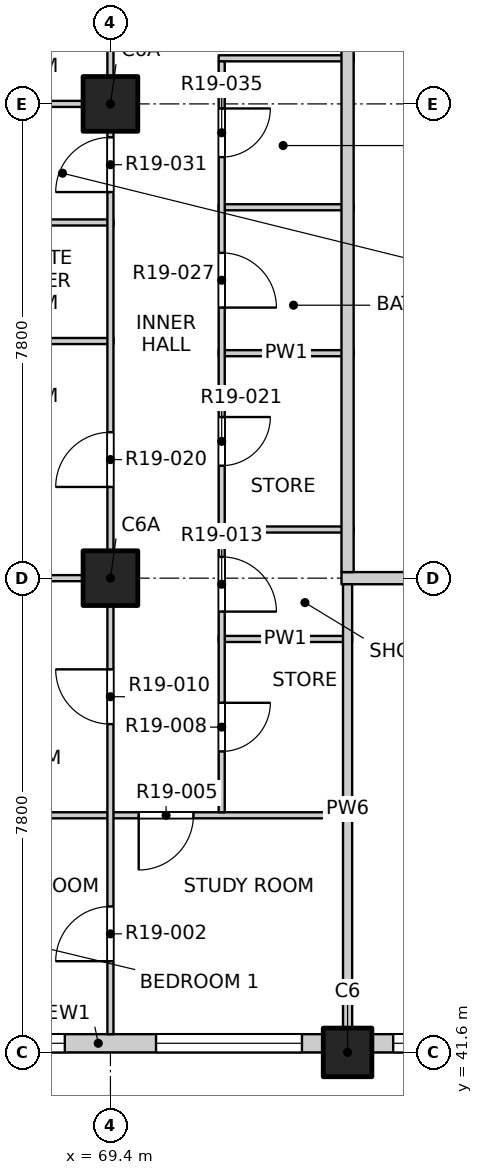
"""IFC4 building model, lengths in metres.
Left out: names, types, materials, properties, quantities, classifications, styles, units other than length and angle.
Written with IfcOpenShell. Run it as: python <this file> out.ifc"""

import sys

from ifc_helpers import new_model, si_unit, direction, frame, frame_2d, origin, origin_2d, place, context, subcontext, project, spatial, rectangle, extrude, element, fill, save


model = new_model("IFC4")
c1 = context("Model", 3, precision=1e-05, world=origin(), true_north=direction((0.0, 1.0)))
c2 = subcontext(c1, "Body", "Model", "MODEL_VIEW")
j1 = project(units=[si_unit("LENGTHUNIT", "METRE"), si_unit("PLANEANGLEUNIT", "RADIAN")], contexts=[c1])
p1 = place(None, origin())
s1 = spatial("IfcSite", under=j1, at=p1, CompositionType="ELEMENT")
p2 = place(p1, origin())
s2 = spatial("IfcBuilding", under=s1, at=p2, CompositionType="ELEMENT")
p3 = place(p2, frame((0.0, 0.0, 197.3)))
s3 = spatial("IfcBuildingStorey", under=s2, at=p3, CompositionType="ELEMENT", Elevation=197.3)
p4 = place(p3, frame((73.3, 41.6, -0.3), z_axis=(0.0, 0.0, 1.0), x_axis=(1.0, 0.0, 0.0)))
e1 = element("IfcColumn", 1, at=p4, inside=s3, PredefinedType="COLUMN", context=c2, shape_type="SweptSolid", body=[
    extrude(rectangle(XDim=0.8, YDim=0.8, at=origin_2d()), origin(), (0.0, 0.0, 1.0), 3.45),
])
for number, where, z_axis, x_axis in (
    (2, (69.4, 49.4, -0.3), (0.0, 0.0, 1.0), (1.0, 0.0, 0.0)),
    (3, (69.4, 57.2, -0.3), (0.0, 0.0, 1.0), (1.0, 0.0, 0.0)),
):
    element("IfcColumn", number, at=place(p3, frame(where, z_axis=z_axis, x_axis=x_axis)), inside=s3, PredefinedType="COLUMN", context=c2, shape_type="SweptSolid", body=[
        extrude(rectangle(XDim=0.9, YDim=0.9, at=origin_2d()), origin(), (0.0, 0.0, 1.0), 3.45),
    ])
p5 = place(p3, frame((65.5, 41.75, 0.0), z_axis=(0.0, 0.0, 1.0), x_axis=(1.0, 0.0, 0.0)))
e4 = element("IfcWall", 4, at=p5, inside=s3, PredefinedType="SOLIDWALL", context=c2, shape_type="SweptSolid", body=[
    extrude(rectangle(XDim=7.4, YDim=0.3, at=frame_2d((3.7, 0.0))), origin(), (0.0, 0.0, 1.0), 2.7),
])
p6 = place(p5, frame((0.75, 0.0, 0.9)))
e5 = element("IfcOpeningElement", 5, at=p6, cuts=e4, PredefinedType="OPENING", context=c2, shape_type="SweptSolid", body=[
    extrude(rectangle(XDim=2.4, YDim=1.8, at=frame_2d((1.2, 0.9))), frame((0.0, 0.16, 0.0), z_axis=(0.0, -1.0, 0.0), x_axis=(1.0, 0.0, 0.0)), (0.0, 0.0, 1.0), 0.32),
])
p7 = place(p5, frame((4.65, 0.0, 0.9)))
e6 = element("IfcOpeningElement", 6, at=p7, cuts=e4, PredefinedType="OPENING", context=c2, shape_type="SweptSolid", body=[
    extrude(rectangle(XDim=2.4, YDim=1.8, at=frame_2d((1.2, 0.9))), frame((0.0, 0.16, 0.0), z_axis=(0.0, -1.0, 0.0), x_axis=(1.0, 0.0, 0.0)), (0.0, 0.0, 1.0), 0.32),
])
p8 = place(p3, frame((73.7, 41.75, 0.0), z_axis=(0.0, 0.0, 1.0), x_axis=(1.0, 0.0, 0.0)))
e7 = element("IfcWall", 7, at=p8, inside=s3, PredefinedType="SOLIDWALL", context=c2, shape_type="SweptSolid", body=[
    extrude(rectangle(XDim=7.0, YDim=0.3, at=frame_2d((3.5, 0.0))), origin(), (0.0, 0.0, 1.0), 2.7),
])
p9 = place(p8, frame((0.35, 0.0, 0.9)))
e8 = element("IfcOpeningElement", 8, at=p9, cuts=e7, PredefinedType="OPENING", context=c2, shape_type="SweptSolid", body=[
    extrude(rectangle(XDim=2.4, YDim=1.8, at=frame_2d((1.2, 0.9))), frame((0.0, 0.16, 0.0), z_axis=(0.0, -1.0, 0.0), x_axis=(1.0, 0.0, 0.0)), (0.0, 0.0, 1.0), 0.32),
])
p10 = place(p8, frame((4.25, 0.0, 0.9)))
e9 = element("IfcOpeningElement", 9, at=p10, cuts=e7, PredefinedType="OPENING", context=c2, shape_type="SweptSolid", body=[
    extrude(rectangle(XDim=2.4, YDim=1.8, at=frame_2d((1.2, 0.9))), frame((0.0, 0.16, 0.0), z_axis=(0.0, -1.0, 0.0), x_axis=(1.0, 0.0, 0.0)), (0.0, 0.0, 1.0), 0.32),
])
p11 = place(p3, frame((61.9, 45.5, 0.0), z_axis=(0.0, 0.0, 1.0), x_axis=(1.0, 0.0, 0.0)))
e10 = element("IfcWall", 10, at=p11, inside=s3, PredefinedType="PARTITIONING", context=c2, shape_type="SweptSolid", body=[
    extrude(rectangle(XDim=11.475, YDim=0.1, at=frame_2d((5.737, 0.0))), origin(), (0.0, 0.0, 1.0), 3.15),
])
p12 = place(p11, frame((7.965, 0.0, 0.0)))
e11 = element("IfcOpeningElement", 11, at=p12, cuts=e10, PredefinedType="OPENING", context=c2, shape_type="SweptSolid", body=[
    extrude(rectangle(XDim=0.9, YDim=2.1, at=frame_2d((0.45, 1.05))), frame((0.0, 0.06, 0.0), z_axis=(0.0, -1.0, 0.0), x_axis=(1.0, 0.0, 0.0)), (0.0, 0.0, 1.0), 0.12),
])
p13 = place(p3, frame((71.18, 48.4, 0.0), z_axis=(0.0, 0.0, 1.0), x_axis=(1.0, 0.0, 0.0)))
e12 = element("IfcWall", 12, at=p13, inside=s3, PredefinedType="PARTITIONING", context=c2, shape_type="SweptSolid", body=[
    extrude(rectangle(XDim=2.195, YDim=0.1, at=frame_2d((1.097, 0.0))), origin(), (0.0, 0.0, 1.0), 3.15),
])
p14 = place(p3, frame((61.9, 49.4, 0.0), z_axis=(0.0, 0.0, 1.0), x_axis=(1.0, 0.0, 0.0)))
e13 = element("IfcWall", 13, at=p14, inside=s3, PredefinedType="PARTITIONING", context=c2, shape_type="SweptSolid", body=[
    extrude(rectangle(XDim=7.55, YDim=0.1, at=frame_2d((3.775, 0.0))), origin(), (0.0, 0.0, 1.0), 3.15),
])
p15 = place(p3, frame((73.2, 49.4, 0.0), z_axis=(0.0, 0.0, 1.0), x_axis=(1.0, 0.0, 0.0)))
e14 = element("IfcWall", 14, at=p15, inside=s3, PredefinedType="PARTITIONING", context=c2, shape_type="SweptSolid", body=[
    extrude(rectangle(XDim=23.6, YDim=0.2, at=frame_2d((11.8, 0.0))), origin(), (0.0, 0.0, 1.0), 3.15),
])
p16 = place(p15, frame((2.25, 0.0, 0.0)))
e15 = element("IfcOpeningElement", 15, at=p16, cuts=e14, PredefinedType="OPENING", context=c2, shape_type="SweptSolid", body=[
    extrude(rectangle(XDim=1.2, YDim=2.1, at=frame_2d((0.6, 1.05))), frame((0.0, 0.11, 0.0), z_axis=(0.0, -1.0, 0.0), x_axis=(1.0, 0.0, 0.0)), (0.0, 0.0, 1.0), 0.22),
])
p17 = place(p15, frame((12.375, 0.0, 0.0)))
e16 = element("IfcOpeningElement", 16, at=p17, cuts=e14, PredefinedType="OPENING", context=c2, shape_type="SweptSolid", body=[
    extrude(rectangle(XDim=1.2, YDim=2.1, at=frame_2d((0.6, 1.05))), frame((0.0, 0.11, 0.0), z_axis=(0.0, -1.0, 0.0), x_axis=(1.0, 0.0, 0.0)), (0.0, 0.0, 1.0), 0.22),
])
p18 = place(p15, frame((20.15, 0.0, 0.0)))
e17 = element("IfcOpeningElement", 17, at=p18, cuts=e14, PredefinedType="OPENING", context=c2, shape_type="SweptSolid", body=[
    extrude(rectangle(XDim=1.2, YDim=2.1, at=frame_2d((0.6, 1.05))), frame((0.0, 0.11, 0.0), z_axis=(0.0, -1.0, 0.0), x_axis=(1.0, 0.0, 0.0)), (0.0, 0.0, 1.0), 0.22),
])
for number, where, z_axis, x_axis in (
    (18, (71.18, 50.2, 0.0), (0.0, 0.0, 1.0), (1.0, 0.0, 0.0)),
    (19, (71.18, 53.1, 0.0), (0.0, 0.0, 1.0), (1.0, 0.0, 0.0)),
):
    element("IfcWall", number, at=place(p3, frame(where, z_axis=z_axis, x_axis=x_axis)), inside=s3, PredefinedType="PARTITIONING", context=c2, shape_type="SweptSolid", body=[
        extrude(rectangle(XDim=2.22, YDim=0.1, at=frame_2d((1.11, 0.0))), origin(), (0.0, 0.0, 1.0), 3.15),
    ])
p19 = place(p3, frame((61.9, 53.3, 0.0), z_axis=(0.0, 0.0, 1.0), x_axis=(1.0, 0.0, 0.0)))
e20 = element("IfcWall", 20, at=p19, inside=s3, PredefinedType="PARTITIONING", context=c2, shape_type="SweptSolid", body=[
    extrude(rectangle(XDim=7.55, YDim=0.1, at=frame_2d((3.775, 0.0))), origin(), (0.0, 0.0, 1.0), 3.15),
])
p20 = place(p3, frame((66.05, 55.25, 0.0), z_axis=(0.0, 0.0, 1.0), x_axis=(1.0, 0.0, 0.0)))
e21 = element("IfcWall", 21, at=p20, inside=s3, PredefinedType="PARTITIONING", context=c2, shape_type="SweptSolid", body=[
    extrude(rectangle(XDim=3.4, YDim=0.1, at=frame_2d((1.7, 0.0))), origin(), (0.0, 0.0, 1.0), 3.15),
])
p21 = place(p3, frame((71.18, 55.5, 0.0), z_axis=(0.0, 0.0, 1.0), x_axis=(1.0, 0.0, 0.0)))
e22 = element("IfcWall", 22, at=p21, inside=s3, PredefinedType="PARTITIONING", context=c2, shape_type="SweptSolid", body=[
    extrude(rectangle(XDim=2.22, YDim=0.1, at=frame_2d((1.11, 0.0))), origin(), (0.0, 0.0, 1.0), 3.15),
])
p22 = place(p3, frame((61.9, 57.2, 0.0), z_axis=(0.0, 0.0, 1.0), x_axis=(1.0, 0.0, 0.0)))
e23 = element("IfcWall", 23, at=p22, inside=s3, PredefinedType="PARTITIONING", context=c2, shape_type="SweptSolid", body=[
    extrude(rectangle(XDim=7.55, YDim=0.1, at=frame_2d((3.775, 0.0))), origin(), (0.0, 0.0, 1.0), 3.15),
])
p23 = place(p3, frame((71.18, 57.95, 0.0), z_axis=(0.0, 0.0, 1.0), x_axis=(1.0, 0.0, 0.0)))
e24 = element("IfcWall", 24, at=p23, inside=s3, PredefinedType="PARTITIONING", context=c2, shape_type="SweptSolid", body=[
    extrude(rectangle(XDim=2.22, YDim=0.1, at=frame_2d((1.11, 0.0))), origin(), (0.0, 0.0, 1.0), 3.15),
])
p24 = place(p3, frame((69.4, 41.9, 0.0), z_axis=(0.0, 0.0, 1.0), x_axis=(0.0, 1.0, 0.0)))
e25 = element("IfcWall", 25, at=p24, inside=s3, PredefinedType="PARTITIONING", context=c2, shape_type="SweptSolid", body=[
    extrude(rectangle(XDim=46.2, YDim=0.1, at=frame_2d((23.1, 0.0))), origin(), (0.0, 0.0, 1.0), 3.15),
])
p25 = place(p24, frame((1.2, 0.0, 0.0)))
e26 = element("IfcOpeningElement", 26, at=p25, cuts=e25, PredefinedType="OPENING", context=c2, shape_type="SweptSolid", body=[
    extrude(rectangle(XDim=0.9, YDim=2.1, at=frame_2d((0.45, 1.05))), frame((0.0, 0.06, 0.0), z_axis=(0.0, -1.0, 0.0), x_axis=(1.0, 0.0, 0.0)), (0.0, 0.0, 1.0), 0.12),
])
p26 = place(p24, frame((5.1, 0.0, 0.0)))
e27 = element("IfcOpeningElement", 27, at=p26, cuts=e25, PredefinedType="OPENING", context=c2, shape_type="SweptSolid", body=[
    extrude(rectangle(XDim=0.9, YDim=2.1, at=frame_2d((0.45, 1.05))), frame((0.0, 0.06, 0.0), z_axis=(0.0, -1.0, 0.0), x_axis=(1.0, 0.0, 0.0)), (0.0, 0.0, 1.0), 0.12),
])
p27 = place(p24, frame((9.0, 0.0, 0.0)))
e28 = element("IfcOpeningElement", 28, at=p27, cuts=e25, PredefinedType="OPENING", context=c2, shape_type="SweptSolid", body=[
    extrude(rectangle(XDim=0.9, YDim=2.1, at=frame_2d((0.45, 1.05))), frame((0.0, 0.06, 0.0), z_axis=(0.0, -1.0, 0.0), x_axis=(1.0, 0.0, 0.0)), (0.0, 0.0, 1.0), 0.12),
])
p28 = place(p24, frame((13.85, 0.0, 0.0)))
e29 = element("IfcOpeningElement", 29, at=p28, cuts=e25, PredefinedType="OPENING", context=c2, shape_type="SweptSolid", body=[
    extrude(rectangle(XDim=0.9, YDim=2.1, at=frame_2d((0.45, 1.05))), frame((0.0, 0.06, 0.0), z_axis=(0.0, -1.0, 0.0), x_axis=(1.0, 0.0, 0.0)), (0.0, 0.0, 1.0), 0.12),
])
p29 = place(p24, frame((17.775, 0.0, 0.0)))
e30 = element("IfcOpeningElement", 30, at=p29, cuts=e25, PredefinedType="OPENING", context=c2, shape_type="SweptSolid", body=[
    extrude(rectangle(XDim=0.9, YDim=2.1, at=frame_2d((0.45, 1.05))), frame((0.0, 0.06, 0.0), z_axis=(0.0, -1.0, 0.0), x_axis=(1.0, 0.0, 0.0)), (0.0, 0.0, 1.0), 0.12),
])
p30 = place(p24, frame((21.625, 0.0, 0.0)))
e31 = element("IfcOpeningElement", 31, at=p30, cuts=e25, PredefinedType="OPENING", context=c2, shape_type="SweptSolid", body=[
    extrude(rectangle(XDim=0.9, YDim=2.1, at=frame_2d((0.45, 1.05))), frame((0.0, 0.06, 0.0), z_axis=(0.0, -1.0, 0.0), x_axis=(1.0, 0.0, 0.0)), (0.0, 0.0, 1.0), 0.12),
])
p31 = place(p24, frame((24.6, 0.0, 0.0)))
e32 = element("IfcOpeningElement", 32, at=p31, cuts=e25, PredefinedType="OPENING", context=c2, shape_type="SweptSolid", body=[
    extrude(rectangle(XDim=0.9, YDim=2.1, at=frame_2d((0.45, 1.05))), frame((0.0, 0.06, 0.0), z_axis=(0.0, -1.0, 0.0), x_axis=(1.0, 0.0, 0.0)), (0.0, 0.0, 1.0), 0.12),
])
p32 = place(p24, frame((29.425, 0.0, 0.0)))
e33 = element("IfcOpeningElement", 33, at=p32, cuts=e25, PredefinedType="OPENING", context=c2, shape_type="SweptSolid", body=[
    extrude(rectangle(XDim=0.9, YDim=2.1, at=frame_2d((0.45, 1.05))), frame((0.0, 0.06, 0.0), z_axis=(0.0, -1.0, 0.0), x_axis=(1.0, 0.0, 0.0)), (0.0, 0.0, 1.0), 0.12),
])
p33 = place(p24, frame((33.375, 0.0, 0.0)))
e34 = element("IfcOpeningElement", 34, at=p33, cuts=e25, PredefinedType="OPENING", context=c2, shape_type="SweptSolid", body=[
    extrude(rectangle(XDim=0.9, YDim=2.1, at=frame_2d((0.45, 1.05))), frame((0.0, 0.06, 0.0), z_axis=(0.0, -1.0, 0.0), x_axis=(1.0, 0.0, 0.0)), (0.0, 0.0, 1.0), 0.12),
])
p34 = place(p24, frame((37.225, 0.0, 0.0)))
e35 = element("IfcOpeningElement", 35, at=p34, cuts=e25, PredefinedType="OPENING", context=c2, shape_type="SweptSolid", body=[
    extrude(rectangle(XDim=0.9, YDim=2.1, at=frame_2d((0.45, 1.05))), frame((0.0, 0.06, 0.0), z_axis=(0.0, -1.0, 0.0), x_axis=(1.0, 0.0, 0.0)), (0.0, 0.0, 1.0), 0.12),
])
p35 = place(p24, frame((40.2, 0.0, 0.0)))
e36 = element("IfcOpeningElement", 36, at=p35, cuts=e25, PredefinedType="OPENING", context=c2, shape_type="SweptSolid", body=[
    extrude(rectangle(XDim=0.9, YDim=2.1, at=frame_2d((0.45, 1.05))), frame((0.0, 0.06, 0.0), z_axis=(0.0, -1.0, 0.0), x_axis=(1.0, 0.0, 0.0)), (0.0, 0.0, 1.0), 0.12),
])
p36 = place(p24, frame((44.1, 0.0, 0.0)))
e37 = element("IfcOpeningElement", 37, at=p36, cuts=e25, PredefinedType="OPENING", context=c2, shape_type="SweptSolid", body=[
    extrude(rectangle(XDim=0.9, YDim=2.1, at=frame_2d((0.45, 1.05))), frame((0.0, 0.06, 0.0), z_axis=(0.0, -1.0, 0.0), x_axis=(1.0, 0.0, 0.0)), (0.0, 0.0, 1.0), 0.12),
])
p37 = place(p3, frame((71.23, 45.55, 0.0), z_axis=(0.0, 0.0, 1.0), x_axis=(0.0, 1.0, 0.0)))
e38 = element("IfcWall", 38, at=p37, inside=s3, PredefinedType="PARTITIONING", context=c2, shape_type="SweptSolid", body=[
    extrude(rectangle(XDim=12.35, YDim=0.1, at=frame_2d((6.175, 0.0))), origin(), (0.0, 0.0, 1.0), 3.15),
])
p38 = place(p37, frame((1.0, 0.0, 0.0)))
e39 = element("IfcOpeningElement", 39, at=p38, cuts=e38, PredefinedType="OPENING", context=c2, shape_type="SweptSolid", body=[
    extrude(rectangle(XDim=0.8, YDim=2.1, at=frame_2d((0.4, 1.05))), frame((0.0, 0.06, 0.0), z_axis=(0.0, -1.0, 0.0), x_axis=(1.0, 0.0, 0.0)), (0.0, 0.0, 1.0), 0.12),
])
p39 = place(p37, frame((3.3, 0.0, 0.0)))
e40 = element("IfcOpeningElement", 40, at=p39, cuts=e38, PredefinedType="OPENING", context=c2, shape_type="SweptSolid", body=[
    extrude(rectangle(XDim=0.9, YDim=2.1, at=frame_2d((0.45, 1.05))), frame((0.0, 0.06, 0.0), z_axis=(0.0, -1.0, 0.0), x_axis=(1.0, 0.0, 0.0)), (0.0, 0.0, 1.0), 0.12),
])
p40 = place(p37, frame((5.7, 0.0, 0.0)))
e41 = element("IfcOpeningElement", 41, at=p40, cuts=e38, PredefinedType="OPENING", context=c2, shape_type="SweptSolid", body=[
    extrude(rectangle(XDim=0.8, YDim=2.1, at=frame_2d((0.4, 1.05))), frame((0.0, 0.06, 0.0), z_axis=(0.0, -1.0, 0.0), x_axis=(1.0, 0.0, 0.0)), (0.0, 0.0, 1.0), 0.12),
])
p41 = place(p37, frame((8.3, 0.0, 0.0)))
e42 = element("IfcOpeningElement", 42, at=p41, cuts=e38, PredefinedType="OPENING", context=c2, shape_type="SweptSolid", body=[
    extrude(rectangle(XDim=0.9, YDim=2.1, at=frame_2d((0.45, 1.05))), frame((0.0, 0.06, 0.0), z_axis=(0.0, -1.0, 0.0), x_axis=(1.0, 0.0, 0.0)), (0.0, 0.0, 1.0), 0.12),
])
p42 = place(p37, frame((10.775, 0.0, 0.0)))
e43 = element("IfcOpeningElement", 43, at=p42, cuts=e38, PredefinedType="OPENING", context=c2, shape_type="SweptSolid", body=[
    extrude(rectangle(XDim=0.8, YDim=2.1, at=frame_2d((0.4, 1.05))), frame((0.0, 0.06, 0.0), z_axis=(0.0, -1.0, 0.0), x_axis=(1.0, 0.0, 0.0)), (0.0, 0.0, 1.0), 0.12),
])
p43 = place(p3, frame((73.3, 41.9, 0.0), z_axis=(0.0, 0.0, 1.0), x_axis=(0.0, 1.0, 0.0)))
e44 = element("IfcWall", 44, at=p43, inside=s3, PredefinedType="PARTITIONING", context=c2, shape_type="SweptSolid", body=[
    extrude(rectangle(XDim=7.4, YDim=0.15, at=frame_2d((3.7, 0.0))), origin(), (0.0, 0.0, 1.0), 3.15),
])
p44 = place(p3, frame((73.3, 49.5, 0.0), z_axis=(0.0, 0.0, 1.0), x_axis=(0.0, 1.0, 0.0)))
e45 = element("IfcWall", 45, at=p44, inside=s3, PredefinedType="PARTITIONING", context=c2, shape_type="SweptSolid", body=[
    extrude(rectangle(XDim=34.9, YDim=0.2, at=frame_2d((17.45, 0.0))), origin(), (0.0, 0.0, 1.0), 3.15),
])
p45 = place(p44, frame((9.725, 0.0, 0.0)))
e46 = element("IfcOpeningElement", 46, at=p45, cuts=e45, PredefinedType="OPENING", context=c2, shape_type="SweptSolid", body=[
    extrude(rectangle(XDim=1.0, YDim=2.1, at=frame_2d((0.5, 1.05))), frame((0.0, 0.11, 0.0), z_axis=(0.0, -1.0, 0.0), x_axis=(1.0, 0.0, 0.0)), (0.0, 0.0, 1.0), 0.22),
])
p46 = place(p44, frame((17.925, 0.0, 0.0)))
e47 = element("IfcOpeningElement", 47, at=p46, cuts=e45, PredefinedType="OPENING", context=c2, shape_type="SweptSolid", body=[
    extrude(rectangle(XDim=1.0, YDim=2.1, at=frame_2d((0.5, 1.05))), frame((0.0, 0.11, 0.0), z_axis=(0.0, -1.0, 0.0), x_axis=(1.0, 0.0, 0.0)), (0.0, 0.0, 1.0), 0.22),
])
p47 = place(p44, frame((33.675, 0.0, 0.0)))
e48 = element("IfcOpeningElement", 48, at=p47, cuts=e45, PredefinedType="OPENING", context=c2, shape_type="SweptSolid", body=[
    extrude(rectangle(XDim=1.0, YDim=2.1, at=frame_2d((0.5, 1.05))), frame((0.0, 0.11, 0.0), z_axis=(0.0, -1.0, 0.0), x_axis=(1.0, 0.0, 0.0)), (0.0, 0.0, 1.0), 0.22),
])
p48 = place(p6, origin())
e49 = element("IfcWindow", 49, at=p48, inside=s3, PartitioningType="DOUBLE_PANEL_VERTICAL", PredefinedType="WINDOW", context=c2, shape_type="SweptSolid", body=[
    extrude(rectangle(XDim=2.4, YDim=1.8, at=frame_2d((1.2, 0.9))), frame((0.0, 0.03, 0.0), z_axis=(0.0, -1.0, 0.0), x_axis=(1.0, 0.0, 0.0)), (0.0, 0.0, 1.0), 0.06),
])
fill(e5, e49)
p49 = place(p7, origin())
e50 = element("IfcWindow", 50, at=p49, inside=s3, PartitioningType="DOUBLE_PANEL_VERTICAL", PredefinedType="WINDOW", context=c2, shape_type="SweptSolid", body=[
    extrude(rectangle(XDim=2.4, YDim=1.8, at=frame_2d((1.2, 0.9))), frame((0.0, 0.03, 0.0), z_axis=(0.0, -1.0, 0.0), x_axis=(1.0, 0.0, 0.0)), (0.0, 0.0, 1.0), 0.06),
])
fill(e6, e50)
p50 = place(p9, origin())
e51 = element("IfcWindow", 51, at=p50, inside=s3, PartitioningType="DOUBLE_PANEL_VERTICAL", PredefinedType="WINDOW", context=c2, shape_type="SweptSolid", body=[
    extrude(rectangle(XDim=2.4, YDim=1.8, at=frame_2d((1.2, 0.9))), frame((0.0, 0.03, 0.0), z_axis=(0.0, -1.0, 0.0), x_axis=(1.0, 0.0, 0.0)), (0.0, 0.0, 1.0), 0.06),
])
fill(e8, e51)
p51 = place(p25, origin())
e52 = element("IfcDoor", 52, at=p51, inside=s3, OperationType="SINGLE_SWING_LEFT", PredefinedType="DOOR", context=c2, shape_type="SweptSolid", body=[
    extrude(rectangle(XDim=0.9, YDim=2.1, at=frame_2d((0.45, 1.05))), frame((0.0, 0.025, 0.0), z_axis=(0.0, -1.0, 0.0), x_axis=(1.0, 0.0, 0.0)), (0.0, 0.0, 1.0), 0.05),
])
fill(e26, e52)
p52 = place(p12, origin())
e53 = element("IfcDoor", 53, at=p52, inside=s3, OperationType="SINGLE_SWING_RIGHT", PredefinedType="DOOR", context=c2, shape_type="SweptSolid", body=[
    extrude(rectangle(XDim=0.9, YDim=2.1, at=frame_2d((0.45, 1.05))), frame((0.0, 0.025, 0.0), z_axis=(0.0, -1.0, 0.0), x_axis=(1.0, 0.0, 0.0)), (0.0, 0.0, 1.0), 0.05),
])
fill(e11, e53)
p53 = place(p38, origin())
e54 = element("IfcDoor", 54, at=p53, inside=s3, OperationType="SINGLE_SWING_LEFT", PredefinedType="DOOR", context=c2, shape_type="SweptSolid", body=[
    extrude(rectangle(XDim=0.8, YDim=2.1, at=frame_2d((0.4, 1.05))), frame((0.0, 0.025, 0.0), z_axis=(0.0, -1.0, 0.0), x_axis=(1.0, 0.0, 0.0)), (0.0, 0.0, 1.0), 0.05),
])
fill(e39, e54)
p54 = place(p26, origin())
e55 = element("IfcDoor", 55, at=p54, inside=s3, OperationType="SINGLE_SWING_RIGHT", PredefinedType="DOOR", context=c2, shape_type="SweptSolid", body=[
    extrude(rectangle(XDim=0.9, YDim=2.1, at=frame_2d((0.45, 1.05))), frame((0.0, 0.025, 0.0), z_axis=(0.0, -1.0, 0.0), x_axis=(1.0, 0.0, 0.0)), (0.0, 0.0, 1.0), 0.05),
])
fill(e27, e55)
p55 = place(p39, origin())
e56 = element("IfcDoor", 56, at=p55, inside=s3, OperationType="SINGLE_SWING_RIGHT", PredefinedType="DOOR", context=c2, shape_type="SweptSolid", body=[
    extrude(rectangle(XDim=0.9, YDim=2.1, at=frame_2d((0.45, 1.05))), frame((0.0, 0.025, 0.0), z_axis=(0.0, -1.0, 0.0), x_axis=(1.0, 0.0, 0.0)), (0.0, 0.0, 1.0), 0.05),
])
fill(e40, e56)
p56 = place(p27, origin())
e57 = element("IfcDoor", 57, at=p56, inside=s3, OperationType="SINGLE_SWING_LEFT", PredefinedType="DOOR", context=c2, shape_type="SweptSolid", body=[
    extrude(rectangle(XDim=0.9, YDim=2.1, at=frame_2d((0.45, 1.05))), frame((0.0, 0.025, 0.0), z_axis=(0.0, -1.0, 0.0), x_axis=(1.0, 0.0, 0.0)), (0.0, 0.0, 1.0), 0.05),
])
fill(e28, e57)
p57 = place(p40, origin())
e58 = element("IfcDoor", 58, at=p57, inside=s3, OperationType="SINGLE_SWING_LEFT", PredefinedType="DOOR", context=c2, shape_type="SweptSolid", body=[
    extrude(rectangle(XDim=0.8, YDim=2.1, at=frame_2d((0.4, 1.05))), frame((0.0, 0.025, 0.0), z_axis=(0.0, -1.0, 0.0), x_axis=(1.0, 0.0, 0.0)), (0.0, 0.0, 1.0), 0.05),
])
fill(e41, e58)
p58 = place(p41, origin())
e59 = element("IfcDoor", 59, at=p58, inside=s3, OperationType="SINGLE_SWING_RIGHT", PredefinedType="DOOR", context=c2, shape_type="SweptSolid", body=[
    extrude(rectangle(XDim=0.9, YDim=2.1, at=frame_2d((0.45, 1.05))), frame((0.0, 0.025, 0.0), z_axis=(0.0, -1.0, 0.0), x_axis=(1.0, 0.0, 0.0)), (0.0, 0.0, 1.0), 0.05),
])
fill(e42, e59)
p59 = place(p28, origin())
e60 = element("IfcDoor", 60, at=p59, inside=s3, OperationType="SINGLE_SWING_LEFT", PredefinedType="DOOR", context=c2, shape_type="SweptSolid", body=[
    extrude(rectangle(XDim=0.9, YDim=2.1, at=frame_2d((0.45, 1.05))), frame((0.0, 0.025, 0.0), z_axis=(0.0, -1.0, 0.0), x_axis=(1.0, 0.0, 0.0)), (0.0, 0.0, 1.0), 0.05),
])
fill(e29, e60)
p60 = place(p42, origin())
e61 = element("IfcDoor", 61, at=p60, inside=s3, OperationType="SINGLE_SWING_LEFT", PredefinedType="DOOR", context=c2, shape_type="SweptSolid", body=[
    extrude(rectangle(XDim=0.8, YDim=2.1, at=frame_2d((0.4, 1.05))), frame((0.0, 0.025, 0.0), z_axis=(0.0, -1.0, 0.0), x_axis=(1.0, 0.0, 0.0)), (0.0, 0.0, 1.0), 0.05),
])
fill(e43, e61)
save(model, sys.argv[1])
